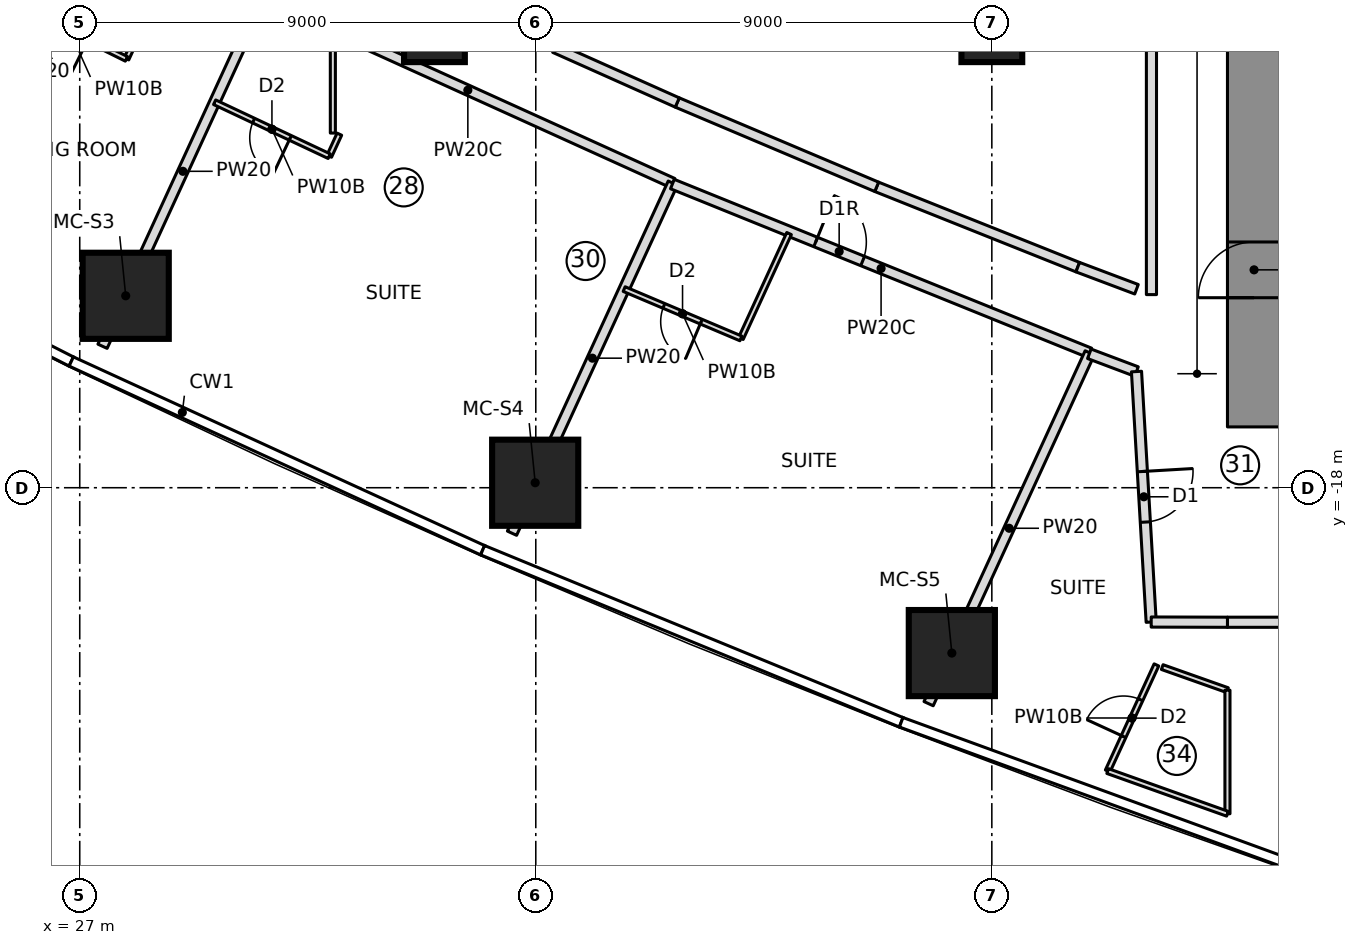
"""IFC4 building model, lengths in metres.
Left out: names, types, materials, properties, quantities, classifications, styles, units other than length and angle.
Written with IfcOpenShell. Run it as: python <this file> out.ifc"""

import sys

from ifc_helpers import new_model, si_unit, direction, frame, frame_2d, origin, origin_2d, place, context, subcontext, project, spatial, rectangle, extrude, element, fill, save


model = new_model("IFC4")
c1 = context("Model", 3, precision=1e-05, world=origin(), true_north=direction((0.0, 1.0)))
c2 = subcontext(c1, "Body", "Model", "MODEL_VIEW")
j1 = project(units=[si_unit("LENGTHUNIT", "METRE"), si_unit("PLANEANGLEUNIT", "RADIAN")], contexts=[c1])
p1 = place(None, origin())
s1 = spatial("IfcSite", under=j1, at=p1, CompositionType="ELEMENT")
p2 = place(p1, origin())
s2 = spatial("IfcBuilding", under=s1, at=p2, CompositionType="ELEMENT")
p3 = place(p2, frame((0.0, 0.0, 99.1)))
s3 = spatial("IfcBuildingStorey", under=s2, at=p3, CompositionType="ELEMENT", Elevation=99.1)
p4 = place(p3, frame((50.175, -16.8, 0.0), z_axis=(0.0, 0.0, 1.0), x_axis=(0.0, 1.0, 0.0)))
e1 = element("IfcWall", 1, at=p4, inside=s3, PredefinedType="SHEAR", context=c2, shape_type="SweptSolid", body=[
    extrude(rectangle(XDim=10.15, YDim=1.05, at=frame_2d((5.075, 0.0))), origin(), (0.0, 0.0, 1.0), 3.55),
])
p5 = place(p4, frame((2.55, 0.0, 0.0)))
e2 = element("IfcOpeningElement", 2, at=p5, cuts=e1, PredefinedType="OPENING", context=c2, shape_type="SweptSolid", body=[
    extrude(rectangle(XDim=1.1, YDim=2.1, at=frame_2d((0.55, 1.05))), frame((0.0, 0.535, 0.0), z_axis=(0.0, -1.0, 0.0), x_axis=(1.0, 0.0, 0.0)), (0.0, 0.0, 1.0), 1.07),
])
for number, where, z_axis, x_axis in (
    (3, (27.907, -14.212, 0.0), (0.0, 0.0, 1.0), (1.0, 0.0, 0.0)),
    (4, (35.988, -17.902, 0.0), (0.0, 0.0, 1.0), (1.0, 0.0, 0.0)),
    (5, (44.211, -21.264, 0.0), (0.0, 0.0, 1.0), (1.0, 0.0, 0.0)),
):
    element("IfcColumn", number, at=place(p3, frame(where, z_axis=z_axis, x_axis=x_axis)), inside=s3, PredefinedType="COLUMN", context=c2, shape_type="SweptSolid", body=[
        extrude(rectangle(XDim=1.7, YDim=1.7, at=origin_2d()), origin(), (0.0, 0.0, 1.0), 3.55),
    ])
for number, where, z_axis, x_axis in (
    (6, (34.0, -9.0, 0.0), (0.0, 0.0, 1.0), (1.0, 0.0, 0.0)),
    (7, (45.0, -9.0, 0.0), (0.0, 0.0, 1.0), (1.0, 0.0, 0.0)),
):
    element("IfcColumn", number, at=place(p3, frame(where, z_axis=z_axis, x_axis=x_axis)), inside=s3, PredefinedType="COLUMN", context=c2, shape_type="SweptSolid", body=[
        extrude(rectangle(XDim=1.2, YDim=1.2, at=origin_2d()), origin(), (0.0, 0.0, 1.0), 3.55),
    ])
p6 = place(p3, frame((23.467, -13.244, 0.0), z_axis=(0.0, 0.0, 1.0), x_axis=(0.417455028008, 0.908697584233, 0.0)))
e8 = element("IfcWall", 8, at=p6, inside=s3, PredefinedType="PARTITIONING", context=c2, shape_type="SweptSolid", body=[
    extrude(rectangle(XDim=7.603, YDim=0.2, at=frame_2d((3.802, 0.0))), origin(), (0.0, 0.0, 1.0), 3.25),
])
p7 = place(p3, frame((28.873, -7.467, 0.0), z_axis=(0.0, 0.0, 1.0), x_axis=(-0.417433204355, -0.908707609686, 0.0)))
e9 = element("IfcWall", 9, at=p7, inside=s3, PredefinedType="PARTITIONING", context=c2, shape_type="SweptSolid", body=[
    extrude(rectangle(XDim=2.278, YDim=0.1, at=frame_2d((1.139, 0.0))), origin(), (0.0, 0.0, 1.0), 3.25),
])
p8 = place(p3, frame((27.922, -9.537, 0.0), z_axis=(0.0, 0.0, 1.0), x_axis=(-0.895944857815, 0.444165297784, 0.0)))
e10 = element("IfcWall", 10, at=p8, inside=s3, PredefinedType="PARTITIONING", context=c2, shape_type="SweptSolid", body=[
    extrude(rectangle(XDim=2.501, YDim=0.1, at=frame_2d((1.25, 0.0))), origin(), (0.0, 0.0, 1.0), 3.25),
])
p9 = place(p8, frame((0.85, 0.0, 0.0)))
e11 = element("IfcOpeningElement", 11, at=p9, cuts=e10, PredefinedType="OPENING", context=c2, shape_type="SweptSolid", body=[
    extrude(rectangle(XDim=0.8, YDim=2.1, at=frame_2d((0.4, 1.05))), frame((0.0, 0.06, 0.0), z_axis=(0.0, -1.0, 0.0), x_axis=(1.0, 0.0, 0.0)), (0.0, 0.0, 1.0), 0.12),
])
p10 = place(p3, frame((27.449, -15.208, 0.0), z_axis=(0.0, 0.0, 1.0), x_axis=(0.417429919618, 0.90870911859, 0.0)))
e12 = element("IfcWall", 12, at=p10, inside=s3, PredefinedType="PARTITIONING", context=c2, shape_type="SweptSolid", body=[
    extrude(rectangle(XDim=7.6, YDim=0.2, at=frame_2d((3.8, 0.0))), origin(), (0.0, 0.0, 1.0), 3.25),
])
p11 = place(p3, frame((30.614, -8.32, 0.0), z_axis=(0.0, 0.0, 1.0), x_axis=(0.910751030363, -0.41295588226, 0.0)))
e13 = element("IfcWall", 13, at=p11, inside=s3, PredefinedType="PARTITIONING", context=c2, shape_type="SweptSolid", body=[
    extrude(rectangle(XDim=8.883, YDim=0.2, at=frame_2d((4.442, 0.0))), origin(), (0.0, 0.0, 1.0), 3.25),
])
p12 = place(p11, frame((0.45, 0.0, 0.0)))
e14 = element("IfcOpeningElement", 14, at=p12, cuts=e13, PredefinedType="OPENING", context=c2, shape_type="SweptSolid", body=[
    extrude(rectangle(XDim=1.0, YDim=2.1, at=frame_2d((0.5, 1.05))), frame((0.0, 0.11, 0.0), z_axis=(0.0, -1.0, 0.0), x_axis=(1.0, 0.0, 0.0)), (0.0, 0.0, 1.0), 0.22),
])
p13 = place(p3, frame((32.124, -11.022, 0.0), z_axis=(0.0, 0.0, 1.0), x_axis=(-0.4176025781, -0.908629785316, 0.0)))
e15 = element("IfcWall", 15, at=p13, inside=s3, PredefinedType="PARTITIONING", context=c2, shape_type="SweptSolid", body=[
    extrude(rectangle(XDim=0.479, YDim=0.1, at=frame_2d((0.239, 0.0))), origin(), (0.0, 0.0, 1.0), 3.25),
])
p14 = place(p3, frame((31.924, -11.457, 0.0), z_axis=(0.0, 0.0, 1.0), x_axis=(-0.904688082375, 0.426074493027, 0.0)))
e16 = element("IfcWall", 16, at=p14, inside=s3, PredefinedType="PARTITIONING", context=c2, shape_type="SweptSolid", body=[
    extrude(rectangle(XDim=2.5, YDim=0.1, at=frame_2d((1.25, 0.0))), origin(), (0.0, 0.0, 1.0), 3.25),
])
p15 = place(p14, frame((0.85, 0.0, 0.0)))
e17 = element("IfcOpeningElement", 17, at=p15, cuts=e16, PredefinedType="OPENING", context=c2, shape_type="SweptSolid", body=[
    extrude(rectangle(XDim=0.8, YDim=2.1, at=frame_2d((0.4, 1.05))), frame((0.0, 0.06, 0.0), z_axis=(0.0, -1.0, 0.0), x_axis=(1.0, 0.0, 0.0)), (0.0, 0.0, 1.0), 0.12),
])
p16 = place(p3, frame((35.531, -18.898, 0.0), z_axis=(0.0, 0.0, 1.0), x_axis=(0.417416334044, 0.908715359215, 0.0)))
e18 = element("IfcWall", 18, at=p16, inside=s3, PredefinedType="PARTITIONING", context=c2, shape_type="SweptSolid", body=[
    extrude(rectangle(XDim=7.604, YDim=0.2, at=frame_2d((3.802, 0.0))), origin(), (0.0, 0.0, 1.0), 3.25),
])
p17 = place(p3, frame((38.696, -12.007, 0.0), z_axis=(0.0, 0.0, 1.0), x_axis=(0.927027566285, -0.374993188401, 0.0)))
e19 = element("IfcWall", 19, at=p17, inside=s3, PredefinedType="PARTITIONING", context=c2, shape_type="SweptSolid", body=[
    extrude(rectangle(XDim=8.885, YDim=0.2, at=frame_2d((4.442, 0.0))), origin(), (0.0, 0.0, 1.0), 3.25),
])
p18 = place(p17, frame((3.05, 0.0, 0.0)))
e20 = element("IfcOpeningElement", 20, at=p18, cuts=e19, PredefinedType="OPENING", context=c2, shape_type="SweptSolid", body=[
    extrude(rectangle(XDim=1.0, YDim=2.1, at=frame_2d((0.5, 1.05))), frame((0.0, 0.11, 0.0), z_axis=(0.0, -1.0, 0.0), x_axis=(1.0, 0.0, 0.0)), (0.0, 0.0, 1.0), 0.22),
])
p19 = place(p3, frame((40.999, -12.984, 0.0), z_axis=(0.0, 0.0, 1.0), x_axis=(-0.417433204355, -0.908707609686, 0.0)))
e21 = element("IfcWall", 21, at=p19, inside=s3, PredefinedType="PARTITIONING", context=c2, shape_type="SweptSolid", body=[
    extrude(rectangle(XDim=2.278, YDim=0.1, at=frame_2d((1.139, 0.0))), origin(), (0.0, 0.0, 1.0), 3.25),
])
p20 = place(p3, frame((40.048, -15.054, 0.0), z_axis=(0.0, 0.0, 1.0), x_axis=(-0.921042675983, 0.38946166566, 0.0)))
e22 = element("IfcWall", 22, at=p20, inside=s3, PredefinedType="PARTITIONING", context=c2, shape_type="SweptSolid", body=[
    extrude(rectangle(XDim=2.501, YDim=0.1, at=frame_2d((1.25, 0.0))), origin(), (0.0, 0.0, 1.0), 3.25),
])
p21 = place(p20, frame((0.85, 0.0, 0.0)))
e23 = element("IfcOpeningElement", 23, at=p21, cuts=e22, PredefinedType="OPENING", context=c2, shape_type="SweptSolid", body=[
    extrude(rectangle(XDim=0.8, YDim=2.1, at=frame_2d((0.4, 1.05))), frame((0.0, 0.06, 0.0), z_axis=(0.0, -1.0, 0.0), x_axis=(1.0, 0.0, 0.0)), (0.0, 0.0, 1.0), 0.12),
])
p22 = place(p3, frame((43.752, -22.262, 0.0), z_axis=(0.0, 0.0, 1.0), x_axis=(0.417437957167, 0.908705426371, 0.0)))
e24 = element("IfcWall", 24, at=p22, inside=s3, PredefinedType="PARTITIONING", context=c2, shape_type="SweptSolid", body=[
    extrude(rectangle(XDim=7.619, YDim=0.2, at=frame_2d((3.81, 0.0))), origin(), (0.0, 0.0, 1.0), 3.25),
])
p23 = place(p3, frame((48.363, -21.54, 0.0), z_axis=(0.0, 0.0, 1.0), x_axis=(0.942692856107, -0.333661773425, 0.0)))
e25 = element("IfcWall", 25, at=p23, inside=s3, PredefinedType="PARTITIONING", context=c2, shape_type="SweptSolid", body=[
    extrude(rectangle(XDim=1.365, YDim=0.1, at=frame_2d((0.683, 0.0))), origin(), (0.0, 0.0, 1.0), 3.25),
])
p24 = place(p3, frame((47.286, -23.592, 0.0), z_axis=(0.0, 0.0, 1.0), x_axis=(0.41749308293, 0.908680100864, 0.0)))
e26 = element("IfcWall", 26, at=p24, inside=s3, PredefinedType="PARTITIONING", context=c2, shape_type="SweptSolid", body=[
    extrude(rectangle(XDim=2.306, YDim=0.1, at=frame_2d((1.153, 0.0))), origin(), (0.0, 0.0, 1.0), 3.25),
])
p25 = place(p24, frame((0.75, 0.0, 0.0)))
e27 = element("IfcOpeningElement", 27, at=p25, cuts=e26, PredefinedType="OPENING", context=c2, shape_type="SweptSolid", body=[
    extrude(rectangle(XDim=0.8, YDim=2.1, at=frame_2d((0.4, 1.05))), frame((0.0, 0.06, 0.0), z_axis=(0.0, -1.0, 0.0), x_axis=(1.0, 0.0, 0.0)), (0.0, 0.0, 1.0), 0.12),
])
p26 = place(p3, frame((46.696, -13.647, 0.0), z_axis=(0.0, 0.0, 1.0), x_axis=(-0.928638161177, 0.370986745864, 0.0)))
e28 = element("IfcWall", 28, at=p26, inside=s3, PredefinedType="PARTITIONING", context=c2, shape_type="SweptSolid", body=[
    extrude(rectangle(XDim=4.273, YDim=0.2, at=frame_2d((2.136, 0.0))), origin(), (0.0, 0.0, 1.0), 3.25),
])
p27 = place(p3, frame((42.728, -12.062, 0.0), z_axis=(0.0, 0.0, 1.0), x_axis=(-0.921037415532, 0.389474105929, 0.0)))
e29 = element("IfcWall", 29, at=p27, inside=s3, PredefinedType="PARTITIONING", context=c2, shape_type="SweptSolid", body=[
    extrude(rectangle(XDim=4.273, YDim=0.2, at=frame_2d((2.137, 0.0))), origin(), (0.0, 0.0, 1.0), 3.25),
])
p28 = place(p3, frame((38.792, -10.397, 0.0), z_axis=(0.0, 0.0, 1.0), x_axis=(-0.913030623494, 0.407891015544, 0.0)))
e30 = element("IfcWall", 30, at=p28, inside=s3, PredefinedType="PARTITIONING", context=c2, shape_type="SweptSolid", body=[
    extrude(rectangle(XDim=2.648, YDim=0.2, at=frame_2d((1.324, 0.0))), origin(), (0.0, 0.0, 1.0), 3.25),
])
p29 = place(p3, frame((49.65, -20.655, 0.0), z_axis=(0.0, 0.0, 1.0), x_axis=(1.0, 0.0, 0.0)))
e31 = element("IfcWall", 31, at=p29, inside=s3, PredefinedType="PARTITIONING", context=c2, shape_type="SweptSolid", body=[
    extrude(rectangle(XDim=4.976, YDim=0.2, at=frame_2d((2.488, 0.0))), origin(), (0.0, 0.0, 1.0), 3.25),
])
p30 = place(p29, frame((1.988, 0.0, 0.0)))
e32 = element("IfcOpeningElement", 32, at=p30, cuts=e31, PredefinedType="OPENING", context=c2, shape_type="SweptSolid", body=[
    extrude(rectangle(XDim=1.5, YDim=2.1, at=frame_2d((0.75, 1.05))), frame((0.0, 0.11, 0.0), z_axis=(0.0, -1.0, 0.0), x_axis=(1.0, 0.0, 0.0)), (0.0, 0.0, 1.0), 0.22),
])
p31 = place(p3, frame((31.995, -8.954, 0.0), z_axis=(0.0, 0.0, 1.0), x_axis=(0.0, -1.0, 0.0)))
e33 = element("IfcWall", 33, at=p31, inside=s3, PredefinedType="PARTITIONING", context=c2, shape_type="SweptSolid", body=[
    extrude(rectangle(XDim=2.046, YDim=0.1, at=frame_2d((1.023, 0.0))), origin(), (0.0, 0.0, 1.0), 3.25),
])
p32 = place(p3, frame((49.65, -21.996, 0.0), z_axis=(0.0, 0.0, 1.0), x_axis=(0.0, -1.0, 0.0)))
e34 = element("IfcWall", 34, at=p32, inside=s3, PredefinedType="PARTITIONING", context=c2, shape_type="SweptSolid", body=[
    extrude(rectangle(XDim=2.439, YDim=0.1, at=frame_2d((1.22, 0.0))), origin(), (0.0, 0.0, 1.0), 3.25),
])
p33 = place(p3, frame((49.65, -24.435, 0.0), z_axis=(0.0, 0.0, 1.0), x_axis=(-0.941933231826, 0.335800218555, 0.0)))
e35 = element("IfcWall", 35, at=p33, inside=s3, PredefinedType="PARTITIONING", context=c2, shape_type="SweptSolid", body=[
    extrude(rectangle(XDim=2.51, YDim=0.1, at=frame_2d((1.255, 0.0))), origin(), (0.0, 0.0, 1.0), 3.25),
])
p34 = place(p3, frame((46.924, -15.357, 0.0), z_axis=(0.0, 0.0, 1.0), x_axis=(0.935803526171, -0.35252199989, 0.0)))
e36 = element("IfcWall", 36, at=p34, inside=s3, PredefinedType="PARTITIONING", context=c2, shape_type="SweptSolid", body=[
    extrude(rectangle(XDim=0.995, YDim=0.2, at=frame_2d((0.497, 0.0))), origin(), (0.0, 0.0, 1.0), 3.25),
])
p35 = place(p3, frame((47.855, -14.083, 0.0), z_axis=(0.0, 0.0, 1.0), x_axis=(-0.935907269358, 0.352246480696, 0.0)))
e37 = element("IfcWall", 37, at=p35, inside=s3, PredefinedType="PARTITIONING", context=c2, shape_type="SweptSolid", body=[
    extrude(rectangle(XDim=1.239, YDim=0.2, at=frame_2d((0.619, 0.0))), origin(), (0.0, 0.0, 1.0), 3.25),
])
p36 = place(p3, frame((47.855, -15.707, 0.0), z_axis=(0.0, 0.0, 1.0), x_axis=(0.058568850083, -0.998283371493, 0.0)))
e38 = element("IfcWall", 38, at=p36, inside=s3, PredefinedType="PARTITIONING", context=c2, shape_type="SweptSolid", body=[
    extrude(rectangle(XDim=4.952, YDim=0.2, at=frame_2d((2.476, 0.0))), origin(), (0.0, 0.0, 1.0), 3.25),
])
p37 = place(p36, frame((1.976, 0.0, 0.0)))
e39 = element("IfcOpeningElement", 39, at=p37, cuts=e38, PredefinedType="OPENING", context=c2, shape_type="SweptSolid", body=[
    extrude(rectangle(XDim=1.0, YDim=2.1, at=frame_2d((0.5, 1.05))), frame((0.0, 0.11, 0.0), z_axis=(0.0, -1.0, 0.0), x_axis=(1.0, 0.0, 0.0)), (0.0, 0.0, 1.0), 0.22),
])
p38 = place(p3, frame((48.15, 14.189, 0.0), z_axis=(0.0, 0.0, 1.0), x_axis=(0.0, -1.0, 0.0)))
e40 = element("IfcWall", 40, at=p38, inside=s3, PredefinedType="PARTITIONING", context=c2, shape_type="SweptSolid", body=[
    extrude(rectangle(XDim=28.377, YDim=0.2, at=frame_2d((14.189, 0.0))), origin(), (0.0, 0.0, 1.0), 3.25),
])
p39 = place(p3, frame((48.145, -20.651, 0.0), z_axis=(0.0, 0.0, 1.0), x_axis=(0.999996196879, -0.002757938895, 0.0)))
e41 = element("IfcWall", 41, at=p39, inside=s3, PredefinedType="PARTITIONING", context=c2, shape_type="SweptSolid", body=[
    extrude(rectangle(XDim=1.505, YDim=0.2, at=frame_2d((0.752, 0.0))), origin(), (0.0, 0.0, 1.0), 3.25),
])
p40 = place(p15, origin())
e42 = element("IfcDoor", 42, at=p40, inside=s3, OperationType="SINGLE_SWING_LEFT", PredefinedType="DOOR", context=c2, shape_type="SweptSolid", body=[
    extrude(rectangle(XDim=0.8, YDim=2.1, at=frame_2d((0.4, 1.05))), frame((0.0, 0.025, 0.0), z_axis=(0.0, -1.0, 0.0), x_axis=(1.0, 0.0, 0.0)), (0.0, 0.0, 1.0), 0.05),
])
fill(e17, e42)
p41 = place(p21, origin())
e43 = element("IfcDoor", 43, at=p41, inside=s3, OperationType="SINGLE_SWING_LEFT", PredefinedType="DOOR", context=c2, shape_type="SweptSolid", body=[
    extrude(rectangle(XDim=0.8, YDim=2.1, at=frame_2d((0.4, 1.05))), frame((0.0, 0.025, 0.0), z_axis=(0.0, -1.0, 0.0), x_axis=(1.0, 0.0, 0.0)), (0.0, 0.0, 1.0), 0.05),
])
fill(e23, e43)
p42 = place(p18, origin())
e44 = element("IfcDoor", 44, at=p42, inside=s3, OperationType="SINGLE_SWING_RIGHT", PredefinedType="DOOR", context=c2, shape_type="SweptSolid", body=[
    extrude(rectangle(XDim=1.0, YDim=2.1, at=frame_2d((0.5, 1.05))), frame((0.0, 0.025, 0.0), z_axis=(0.0, -1.0, 0.0), x_axis=(1.0, 0.0, 0.0)), (0.0, 0.0, 1.0), 0.05),
])
fill(e20, e44)
p43 = place(p25, origin())
e45 = element("IfcDoor", 45, at=p43, inside=s3, OperationType="SINGLE_SWING_LEFT", PredefinedType="DOOR", context=c2, shape_type="SweptSolid", body=[
    extrude(rectangle(XDim=0.8, YDim=2.1, at=frame_2d((0.4, 1.05))), frame((0.0, 0.025, 0.0), z_axis=(0.0, -1.0, 0.0), x_axis=(1.0, 0.0, 0.0)), (0.0, 0.0, 1.0), 0.05),
])
fill(e27, e45)
p44 = place(p37, origin())
e46 = element("IfcDoor", 46, at=p44, inside=s3, OperationType="SINGLE_SWING_LEFT", PredefinedType="DOOR", context=c2, shape_type="SweptSolid", body=[
    extrude(rectangle(XDim=1.0, YDim=2.1, at=frame_2d((0.5, 1.05))), frame((0.0, 0.025, 0.0), z_axis=(0.0, -1.0, 0.0), x_axis=(1.0, 0.0, 0.0)), (0.0, 0.0, 1.0), 0.05),
])
fill(e39, e46)
p45 = place(p5, origin())
e47 = element("IfcDoor", 47, at=p45, inside=s3, OperationType="SINGLE_SWING_RIGHT", PredefinedType="DOOR", context=c2, shape_type="SweptSolid", body=[
    extrude(rectangle(XDim=1.1, YDim=2.1, at=frame_2d((0.55, 1.05))), frame((0.0, 0.025, 0.0), z_axis=(0.0, -1.0, 0.0), x_axis=(1.0, 0.0, 0.0)), (0.0, 0.0, 1.0), 0.05),
])
fill(e2, e47)
save(model, sys.argv[1])
